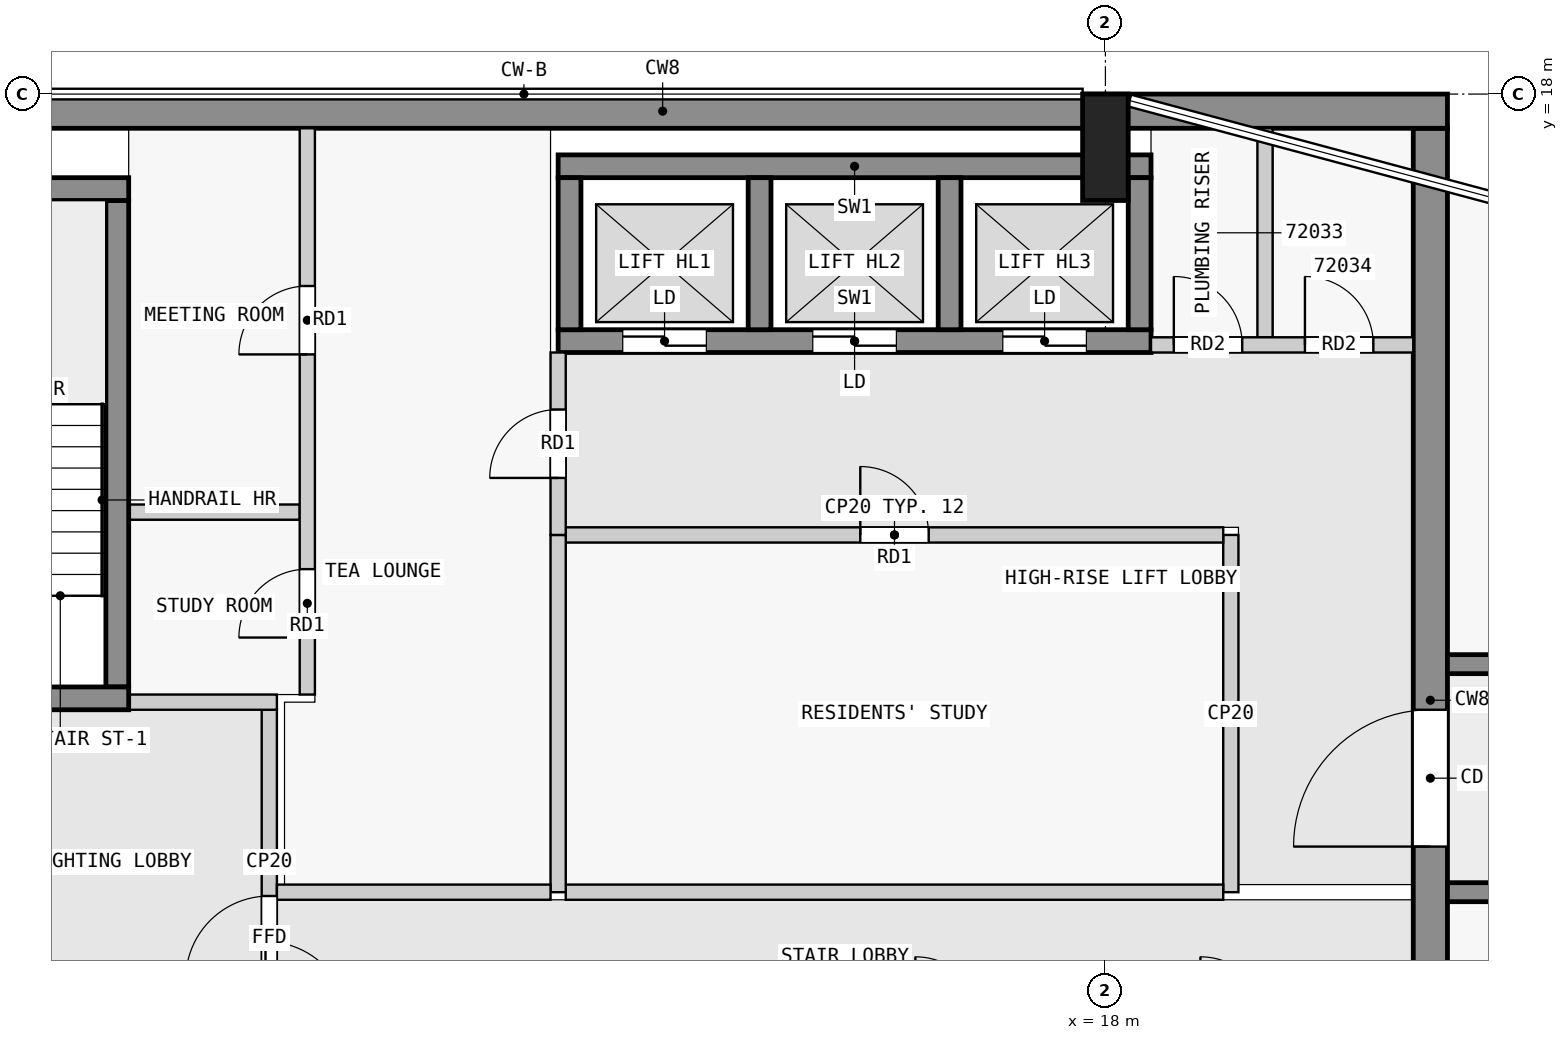
"""IFC4 building model, lengths in metres.
Left out: names, types, materials, properties, quantities, classifications, styles, units other than length and angle.
Written with IfcOpenShell. Run it as: python <this file> out.ifc"""

import sys

from ifc_helpers import new_model, si_unit, direction, frame, frame_2d, origin, origin_2d, place, context, subcontext, project, spatial, rectangle, extrude, element, fill, save


model = new_model("IFC4")
c1 = context("Model", 3, precision=1e-05, world=origin(), true_north=direction((0.0, 1.0)))
c2 = subcontext(c1, "Body", "Model", "MODEL_VIEW")
j1 = project(units=[si_unit("LENGTHUNIT", "METRE"), si_unit("PLANEANGLEUNIT", "RADIAN")], contexts=[c1])
p1 = place(None, origin())
s1 = spatial("IfcSite", under=j1, at=p1, CompositionType="ELEMENT")
p2 = place(p1, origin())
s2 = spatial("IfcBuilding", under=s1, at=p2, CompositionType="ELEMENT")
p3 = place(p2, frame((0.0, 0.0, 273.9)))
s3 = spatial("IfcBuildingStorey", under=s2, at=p3, CompositionType="ELEMENT", Elevation=273.9)
p4 = place(p3, frame((18.0, 17.3, 0.0), z_axis=(0.0, 0.0, 1.0), x_axis=(1.0, 0.0, 0.0)))
e1 = element("IfcColumn", 1, at=p4, inside=s3, PredefinedType="COLUMN", context=c2, shape_type="SweptSolid", body=[
    extrude(rectangle(XDim=0.6, YDim=1.4, at=origin_2d()), origin(), (0.0, 0.0, 1.0), 3.5),
])
p5 = place(p3, frame((1.85, 17.775, 0.0), z_axis=(0.0, 0.0, 1.0), x_axis=(1.0, 0.0, 0.0)))
e2 = element("IfcWall", 2, at=p5, inside=s3, PredefinedType="SHEAR", context=c2, shape_type="SweptSolid", body=[
    extrude(rectangle(XDim=20.65, YDim=0.45, at=frame_2d((10.325, 0.0))), origin(), (0.0, 0.0, 1.0), 3.25),
])
p6 = place(p3, frame((22.275, 2.5, 0.0), z_axis=(0.0, 0.0, 1.0), x_axis=(0.0, 1.0, 0.0)))
e3 = element("IfcWall", 3, at=p6, inside=s3, PredefinedType="SHEAR", context=c2, shape_type="SweptSolid", body=[
    extrude(rectangle(XDim=15.05, YDim=0.45, at=frame_2d((7.525, 0.0))), origin(), (0.0, 0.0, 1.0), 3.25),
])
p7 = place(p6, frame((5.6, 0.0, 0.0)))
e4 = element("IfcOpeningElement", 4, at=p7, cuts=e3, PredefinedType="OPENING", context=c2, shape_type="SweptSolid", body=[
    extrude(rectangle(XDim=1.8, YDim=2.1, at=frame_2d((0.9, 1.05))), frame((0.0, 0.235, 0.0), z_axis=(0.0, -1.0, 0.0), x_axis=(1.0, 0.0, 0.0)), (0.0, 0.0, 1.0), 0.47),
])
p8 = place(p3, frame((2.3, 10.05, 0.0), z_axis=(0.0, 0.0, 1.0), x_axis=(1.0, 0.0, 0.0)))
e5 = element("IfcWall", 5, at=p8, inside=s3, PredefinedType="SHEAR", context=c2, shape_type="SweptSolid", body=[
    extrude(rectangle(XDim=2.85, YDim=0.3, at=frame_2d((1.425, 0.0))), origin(), (0.0, 0.0, 1.0), 3.25),
])
p9 = place(p8, frame((0.25, 0.0, 0.0)))
e6 = element("IfcOpeningElement", 6, at=p9, cuts=e5, PredefinedType="OPENING", context=c2, shape_type="SweptSolid", body=[
    extrude(rectangle(XDim=1.1, YDim=2.1, at=frame_2d((0.55, 1.05))), frame((0.0, 0.16, 0.0), z_axis=(0.0, -1.0, 0.0), x_axis=(1.0, 0.0, 0.0)), (0.0, 0.0, 1.0), 0.32),
])
p10 = place(p3, frame((5.0, 10.2, 0.0), z_axis=(0.0, 0.0, 1.0), x_axis=(0.0, 1.0, 0.0)))
e7 = element("IfcWall", 7, at=p10, inside=s3, PredefinedType="SHEAR", context=c2, shape_type="SweptSolid", body=[
    extrude(rectangle(XDim=6.4, YDim=0.3, at=frame_2d((3.2, 0.0))), origin(), (0.0, 0.0, 1.0), 3.25),
])
p11 = place(p3, frame((2.3, 16.75, 0.0), z_axis=(0.0, 0.0, 1.0), x_axis=(1.0, 0.0, 0.0)))
e8 = element("IfcWall", 8, at=p11, inside=s3, PredefinedType="SHEAR", context=c2, shape_type="SweptSolid", body=[
    extrude(rectangle(XDim=2.85, YDim=0.3, at=frame_2d((1.425, 0.0))), origin(), (0.0, 0.0, 1.0), 3.25),
])
p12 = place(p3, frame((10.8, 17.05, 0.0), z_axis=(0.0, 0.0, 1.0), x_axis=(1.0, 0.0, 0.0)))
e9 = element("IfcWall", 9, at=p12, inside=s3, PredefinedType="SHEAR", context=c2, shape_type="SweptSolid", body=[
    extrude(rectangle(XDim=7.8, YDim=0.3, at=frame_2d((3.9, 0.0))), origin(), (0.0, 0.0, 1.0), 3.25),
])
p13 = place(p3, frame((10.8, 14.75, 0.0), z_axis=(0.0, 0.0, 1.0), x_axis=(1.0, 0.0, 0.0)))
e10 = element("IfcWall", 10, at=p13, inside=s3, PredefinedType="SHEAR", context=c2, shape_type="SweptSolid", body=[
    extrude(rectangle(XDim=7.8, YDim=0.3, at=frame_2d((3.9, 0.0))), origin(), (0.0, 0.0, 1.0), 3.25),
])
p14 = place(p13, frame((0.85, 0.0, 0.0)))
e11 = element("IfcOpeningElement", 11, at=p14, cuts=e10, PredefinedType="OPENING", context=c2, shape_type="SweptSolid", body=[
    extrude(rectangle(XDim=1.1, YDim=2.1, at=frame_2d((0.55, 1.05))), frame((0.0, 0.16, 0.0), z_axis=(0.0, -1.0, 0.0), x_axis=(1.0, 0.0, 0.0)), (0.0, 0.0, 1.0), 0.32),
])
p15 = place(p13, frame((3.35, 0.0, 0.0)))
e12 = element("IfcOpeningElement", 12, at=p15, cuts=e10, PredefinedType="OPENING", context=c2, shape_type="SweptSolid", body=[
    extrude(rectangle(XDim=1.1, YDim=2.1, at=frame_2d((0.55, 1.05))), frame((0.0, 0.16, 0.0), z_axis=(0.0, -1.0, 0.0), x_axis=(1.0, 0.0, 0.0)), (0.0, 0.0, 1.0), 0.32),
])
p16 = place(p13, frame((5.85, 0.0, 0.0)))
e13 = element("IfcOpeningElement", 13, at=p16, cuts=e10, PredefinedType="OPENING", context=c2, shape_type="SweptSolid", body=[
    extrude(rectangle(XDim=1.1, YDim=2.1, at=frame_2d((0.55, 1.05))), frame((0.0, 0.16, 0.0), z_axis=(0.0, -1.0, 0.0), x_axis=(1.0, 0.0, 0.0)), (0.0, 0.0, 1.0), 0.32),
])
for number, where, z_axis, x_axis in (
    (14, (10.95, 14.9, 0.0), (0.0, 0.0, 1.0), (0.0, 1.0, 0.0)),
    (15, (13.45, 14.9, 0.0), (0.0, 0.0, 1.0), (0.0, 1.0, 0.0)),
    (16, (15.95, 14.9, 0.0), (0.0, 0.0, 1.0), (0.0, 1.0, 0.0)),
    (17, (18.45, 14.9, 0.0), (0.0, 0.0, 1.0), (0.0, 1.0, 0.0)),
):
    element("IfcWall", number, at=place(p3, frame(where, z_axis=z_axis, x_axis=x_axis)), inside=s3, PredefinedType="SHEAR", context=c2, shape_type="SweptSolid", body=[
        extrude(rectangle(XDim=2.0, YDim=0.3, at=frame_2d((1.0, 0.0))), origin(), (0.0, 0.0, 1.0), 3.25),
    ])
p17 = place(p3, frame((22.5, 7.5, 0.0), z_axis=(0.0, 0.0, 1.0), x_axis=(1.0, 0.0, 0.0)))
e18 = element("IfcWall", 18, at=p17, inside=s3, PredefinedType="SHEAR", context=c2, shape_type="SweptSolid", body=[
    extrude(rectangle(XDim=22.5, YDim=0.25, at=frame_2d((11.25, 0.0))), origin(), (0.0, 0.0, 1.0), 3.25),
])
p18 = place(p17, frame((1.85, 0.0, 0.0)))
e19 = element("IfcOpeningElement", 19, at=p18, cuts=e18, PredefinedType="OPENING", context=c2, shape_type="SweptSolid", body=[
    extrude(rectangle(XDim=0.9, YDim=2.1, at=frame_2d((0.45, 1.05))), frame((0.0, 0.135, 0.0), z_axis=(0.0, -1.0, 0.0), x_axis=(1.0, 0.0, 0.0)), (0.0, 0.0, 1.0), 0.27),
])
p19 = place(p17, frame((6.25, 0.0, 0.0)))
e20 = element("IfcOpeningElement", 20, at=p19, cuts=e18, PredefinedType="OPENING", context=c2, shape_type="SweptSolid", body=[
    extrude(rectangle(XDim=1.0, YDim=2.1, at=frame_2d((0.5, 1.05))), frame((0.0, 0.135, 0.0), z_axis=(0.0, -1.0, 0.0), x_axis=(1.0, 0.0, 0.0)), (0.0, 0.0, 1.0), 0.27),
])
p20 = place(p17, frame((10.35, 0.0, 0.0)))
e21 = element("IfcOpeningElement", 21, at=p20, cuts=e18, PredefinedType="OPENING", context=c2, shape_type="SweptSolid", body=[
    extrude(rectangle(XDim=1.8, YDim=2.1, at=frame_2d((0.9, 1.05))), frame((0.0, 0.135, 0.0), z_axis=(0.0, -1.0, 0.0), x_axis=(1.0, 0.0, 0.0)), (0.0, 0.0, 1.0), 0.27),
])
p21 = place(p17, frame((16.85, 0.0, 0.0)))
e22 = element("IfcOpeningElement", 22, at=p21, cuts=e18, PredefinedType="OPENING", context=c2, shape_type="SweptSolid", body=[
    extrude(rectangle(XDim=1.0, YDim=2.1, at=frame_2d((0.5, 1.05))), frame((0.0, 0.135, 0.0), z_axis=(0.0, -1.0, 0.0), x_axis=(1.0, 0.0, 0.0)), (0.0, 0.0, 1.0), 0.27),
])
p22 = place(p3, frame((22.5, 10.5, 0.0), z_axis=(0.0, 0.0, 1.0), x_axis=(1.0, 0.0, 0.0)))
e23 = element("IfcWall", 23, at=p22, inside=s3, PredefinedType="SHEAR", context=c2, shape_type="SweptSolid", body=[
    extrude(rectangle(XDim=22.5, YDim=0.25, at=frame_2d((11.25, 0.0))), origin(), (0.0, 0.0, 1.0), 3.25),
])
p23 = place(p22, frame((1.85, 0.0, 0.0)))
e24 = element("IfcOpeningElement", 24, at=p23, cuts=e23, PredefinedType="OPENING", context=c2, shape_type="SweptSolid", body=[
    extrude(rectangle(XDim=0.9, YDim=2.1, at=frame_2d((0.45, 1.05))), frame((0.0, 0.135, 0.0), z_axis=(0.0, -1.0, 0.0), x_axis=(1.0, 0.0, 0.0)), (0.0, 0.0, 1.0), 0.27),
])
p24 = place(p22, frame((10.05, 0.0, 0.0)))
e25 = element("IfcOpeningElement", 25, at=p24, cuts=e23, PredefinedType="OPENING", context=c2, shape_type="SweptSolid", body=[
    extrude(rectangle(XDim=1.0, YDim=2.1, at=frame_2d((0.5, 1.05))), frame((0.0, 0.135, 0.0), z_axis=(0.0, -1.0, 0.0), x_axis=(1.0, 0.0, 0.0)), (0.0, 0.0, 1.0), 0.27),
])
p25 = place(p22, frame((18.75, 0.0, 0.0)))
e26 = element("IfcOpeningElement", 26, at=p25, cuts=e23, PredefinedType="OPENING", context=c2, shape_type="SweptSolid", body=[
    extrude(rectangle(XDim=0.9, YDim=2.1, at=frame_2d((0.45, 1.05))), frame((0.0, 0.135, 0.0), z_axis=(0.0, -1.0, 0.0), x_axis=(1.0, 0.0, 0.0)), (0.0, 0.0, 1.0), 0.27),
])
p26 = place(p22, frame((20.95, 0.0, 0.0)))
e27 = element("IfcOpeningElement", 27, at=p26, cuts=e23, PredefinedType="OPENING", context=c2, shape_type="SweptSolid", body=[
    extrude(rectangle(XDim=1.0, YDim=2.1, at=frame_2d((0.5, 1.05))), frame((0.0, 0.135, 0.0), z_axis=(0.0, -1.0, 0.0), x_axis=(1.0, 0.0, 0.0)), (0.0, 0.0, 1.0), 0.27),
])
p27 = place(p3, frame((7.0, 5.9, 0.0), z_axis=(0.0, 0.0, 1.0), x_axis=(0.0, 1.0, 0.0)))
e28 = element("IfcWall", 28, at=p27, inside=s3, PredefinedType="PARTITIONING", context=c2, shape_type="SweptSolid", body=[
    extrude(rectangle(XDim=4.0, YDim=0.2, at=frame_2d((2.0, 0.0))), origin(), (0.0, 0.0, 1.0), 3.25),
])
p28 = place(p27, frame((0.45, 0.0, 0.0)))
e29 = element("IfcOpeningElement", 29, at=p28, cuts=e28, PredefinedType="OPENING", context=c2, shape_type="SweptSolid", body=[
    extrude(rectangle(XDim=1.1, YDim=2.1, at=frame_2d((0.55, 1.05))), frame((0.0, 0.11, 0.0), z_axis=(0.0, -1.0, 0.0), x_axis=(1.0, 0.0, 0.0)), (0.0, 0.0, 1.0), 0.22),
])
p29 = place(p3, frame((5.15, 10.0, 0.0), z_axis=(0.0, 0.0, 1.0), x_axis=(1.0, 0.0, 0.0)))
e30 = element("IfcWall", 30, at=p29, inside=s3, PredefinedType="PARTITIONING", context=c2, shape_type="SweptSolid", body=[
    extrude(rectangle(XDim=1.95, YDim=0.2, at=frame_2d((0.975, 0.0))), origin(), (0.0, 0.0, 1.0), 3.25),
])
p30 = place(p3, frame((7.1, 7.5, 0.0), z_axis=(0.0, 0.0, 1.0), x_axis=(1.0, 0.0, 0.0)))
e31 = element("IfcWall", 31, at=p30, inside=s3, PredefinedType="PARTITIONING", context=c2, shape_type="SweptSolid", body=[
    extrude(rectangle(XDim=3.6, YDim=0.2, at=frame_2d((1.8, 0.0))), origin(), (0.0, 0.0, 1.0), 3.25),
])
p31 = place(p3, frame((10.8, 12.2, 0.0), z_axis=(0.0, 0.0, 1.0), x_axis=(0.0, 1.0, 0.0)))
e32 = element("IfcWall", 32, at=p31, inside=s3, PredefinedType="PARTITIONING", context=c2, shape_type="SweptSolid", body=[
    extrude(rectangle(XDim=2.4, YDim=0.2, at=frame_2d((1.2, 0.0))), origin(), (0.0, 0.0, 1.0), 3.25),
])
p32 = place(p31, frame((0.75, 0.0, 0.0)))
e33 = element("IfcOpeningElement", 33, at=p32, cuts=e32, PredefinedType="OPENING", context=c2, shape_type="SweptSolid", body=[
    extrude(rectangle(XDim=0.9, YDim=2.1, at=frame_2d((0.45, 1.05))), frame((0.0, 0.11, 0.0), z_axis=(0.0, -1.0, 0.0), x_axis=(1.0, 0.0, 0.0)), (0.0, 0.0, 1.0), 0.22),
])
p33 = place(p3, frame((10.8, 7.5, 0.0), z_axis=(0.0, 0.0, 1.0), x_axis=(0.0, 1.0, 0.0)))
e34 = element("IfcWall", 34, at=p33, inside=s3, PredefinedType="PARTITIONING", context=c2, shape_type="SweptSolid", body=[
    extrude(rectangle(XDim=4.7, YDim=0.2, at=frame_2d((2.35, 0.0))), origin(), (0.0, 0.0, 1.0), 3.25),
])
p34 = place(p3, frame((10.9, 7.5, 0.0), z_axis=(0.0, 0.0, 1.0), x_axis=(1.0, 0.0, 0.0)))
e35 = element("IfcWall", 35, at=p34, inside=s3, PredefinedType="PARTITIONING", context=c2, shape_type="SweptSolid", body=[
    extrude(rectangle(XDim=8.65, YDim=0.2, at=frame_2d((4.325, 0.0))), origin(), (0.0, 0.0, 1.0), 3.25),
])
p35 = place(p3, frame((19.65, 7.5, 0.0), z_axis=(0.0, 0.0, 1.0), x_axis=(0.0, 1.0, 0.0)))
e36 = element("IfcWall", 36, at=p35, inside=s3, PredefinedType="PARTITIONING", context=c2, shape_type="SweptSolid", body=[
    extrude(rectangle(XDim=4.7, YDim=0.2, at=frame_2d((2.35, 0.0))), origin(), (0.0, 0.0, 1.0), 3.25),
])
p36 = place(p3, frame((10.9, 12.2, 0.0), z_axis=(0.0, 0.0, 1.0), x_axis=(1.0, 0.0, 0.0)))
e37 = element("IfcWall", 37, at=p36, inside=s3, PredefinedType="PARTITIONING", context=c2, shape_type="SweptSolid", body=[
    extrude(rectangle(XDim=8.65, YDim=0.2, at=frame_2d((4.325, 0.0))), origin(), (0.0, 0.0, 1.0), 3.25),
])
p37 = place(p36, frame((3.875, 0.0, 0.0)))
e38 = element("IfcOpeningElement", 38, at=p37, cuts=e37, PredefinedType="OPENING", context=c2, shape_type="SweptSolid", body=[
    extrude(rectangle(XDim=0.9, YDim=2.1, at=frame_2d((0.45, 1.05))), frame((0.0, 0.11, 0.0), z_axis=(0.0, -1.0, 0.0), x_axis=(1.0, 0.0, 0.0)), (0.0, 0.0, 1.0), 0.22),
])
p38 = place(p3, frame((7.5, 10.1, 0.0), z_axis=(0.0, 0.0, 1.0), x_axis=(0.0, 1.0, 0.0)))
e39 = element("IfcWall", 39, at=p38, inside=s3, PredefinedType="PARTITIONING", context=c2, shape_type="SweptSolid", body=[
    extrude(rectangle(XDim=7.45, YDim=0.2, at=frame_2d((3.725, 0.0))), origin(), (0.0, 0.0, 1.0), 3.25),
])
p39 = place(p38, frame((0.75, 0.0, 0.0)))
e40 = element("IfcOpeningElement", 40, at=p39, cuts=e39, PredefinedType="OPENING", context=c2, shape_type="SweptSolid", body=[
    extrude(rectangle(XDim=0.9, YDim=2.1, at=frame_2d((0.45, 1.05))), frame((0.0, 0.11, 0.0), z_axis=(0.0, -1.0, 0.0), x_axis=(1.0, 0.0, 0.0)), (0.0, 0.0, 1.0), 0.22),
])
p40 = place(p38, frame((4.475, 0.0, 0.0)))
e41 = element("IfcOpeningElement", 41, at=p40, cuts=e39, PredefinedType="OPENING", context=c2, shape_type="SweptSolid", body=[
    extrude(rectangle(XDim=0.9, YDim=2.1, at=frame_2d((0.45, 1.05))), frame((0.0, 0.11, 0.0), z_axis=(0.0, -1.0, 0.0), x_axis=(1.0, 0.0, 0.0)), (0.0, 0.0, 1.0), 0.22),
])
p41 = place(p3, frame((5.15, 12.5, 0.0), z_axis=(0.0, 0.0, 1.0), x_axis=(1.0, 0.0, 0.0)))
e42 = element("IfcWall", 42, at=p41, inside=s3, PredefinedType="PARTITIONING", context=c2, shape_type="SweptSolid", body=[
    extrude(rectangle(XDim=2.25, YDim=0.2, at=frame_2d((1.125, 0.0))), origin(), (0.0, 0.0, 1.0), 3.25),
])
p42 = place(p3, frame((18.6, 14.7, 0.0), z_axis=(0.0, 0.0, 1.0), x_axis=(1.0, 0.0, 0.0)))
e43 = element("IfcWall", 43, at=p42, inside=s3, PredefinedType="PARTITIONING", context=c2, shape_type="SweptSolid", body=[
    extrude(rectangle(XDim=3.45, YDim=0.2, at=frame_2d((1.725, 0.0))), origin(), (0.0, 0.0, 1.0), 3.25),
])
p43 = place(p42, frame((0.3, 0.0, 0.0)))
e44 = element("IfcOpeningElement", 44, at=p43, cuts=e43, PredefinedType="OPENING", context=c2, shape_type="SweptSolid", body=[
    extrude(rectangle(XDim=0.9, YDim=2.1, at=frame_2d((0.45, 1.05))), frame((0.0, 0.11, 0.0), z_axis=(0.0, -1.0, 0.0), x_axis=(1.0, 0.0, 0.0)), (0.0, 0.0, 1.0), 0.22),
])
p44 = place(p42, frame((2.025, 0.0, 0.0)))
e45 = element("IfcOpeningElement", 45, at=p44, cuts=e43, PredefinedType="OPENING", context=c2, shape_type="SweptSolid", body=[
    extrude(rectangle(XDim=0.9, YDim=2.1, at=frame_2d((0.45, 1.05))), frame((0.0, 0.11, 0.0), z_axis=(0.0, -1.0, 0.0), x_axis=(1.0, 0.0, 0.0)), (0.0, 0.0, 1.0), 0.22),
])
p45 = place(p3, frame((20.1, 14.8, 0.0), z_axis=(0.0, 0.0, 1.0), x_axis=(0.0, 1.0, 0.0)))
e46 = element("IfcWall", 46, at=p45, inside=s3, PredefinedType="PARTITIONING", context=c2, shape_type="SweptSolid", body=[
    extrude(rectangle(XDim=2.75, YDim=0.2, at=frame_2d((1.375, 0.0))), origin(), (0.0, 0.0, 1.0), 3.25),
])
p46 = place(p28, origin())
e47 = element("IfcDoor", 47, at=p46, inside=s3, OperationType="SINGLE_SWING_LEFT", PredefinedType="DOOR", context=c2, shape_type="SweptSolid", body=[
    extrude(rectangle(XDim=1.1, YDim=2.1, at=frame_2d((0.55, 1.05))), frame((0.0, 0.025, 0.0), z_axis=(0.0, -1.0, 0.0), x_axis=(1.0, 0.0, 0.0)), (0.0, 0.0, 1.0), 0.05),
])
fill(e29, e47)
p47 = place(p32, origin())
e48 = element("IfcDoor", 48, at=p47, inside=s3, OperationType="SINGLE_SWING_LEFT", PredefinedType="DOOR", context=c2, shape_type="SweptSolid", body=[
    extrude(rectangle(XDim=0.9, YDim=2.1, at=frame_2d((0.45, 1.05))), frame((0.0, 0.025, 0.0), z_axis=(0.0, -1.0, 0.0), x_axis=(1.0, 0.0, 0.0)), (0.0, 0.0, 1.0), 0.05),
])
fill(e33, e48)
p48 = place(p37, origin())
e49 = element("IfcDoor", 49, at=p48, inside=s3, OperationType="SINGLE_SWING_LEFT", PredefinedType="DOOR", context=c2, shape_type="SweptSolid", body=[
    extrude(rectangle(XDim=0.9, YDim=2.1, at=frame_2d((0.45, 1.05))), frame((0.0, 0.025, 0.0), z_axis=(0.0, -1.0, 0.0), x_axis=(1.0, 0.0, 0.0)), (0.0, 0.0, 1.0), 0.05),
])
fill(e38, e49)
p49 = place(p14, origin())
e50 = element("IfcDoor", 50, at=p49, inside=s3, OperationType="DOUBLE_DOOR_SLIDING", PredefinedType="DOOR", context=c2, shape_type="SweptSolid", body=[
    extrude(rectangle(XDim=1.1, YDim=2.1, at=frame_2d((0.55, 1.05))), frame((0.0, 0.025, 0.0), z_axis=(0.0, -1.0, 0.0), x_axis=(1.0, 0.0, 0.0)), (0.0, 0.0, 1.0), 0.05),
])
fill(e11, e50)
p50 = place(p15, origin())
e51 = element("IfcDoor", 51, at=p50, inside=s3, OperationType="DOUBLE_DOOR_SLIDING", PredefinedType="DOOR", context=c2, shape_type="SweptSolid", body=[
    extrude(rectangle(XDim=1.1, YDim=2.1, at=frame_2d((0.55, 1.05))), frame((0.0, 0.025, 0.0), z_axis=(0.0, -1.0, 0.0), x_axis=(1.0, 0.0, 0.0)), (0.0, 0.0, 1.0), 0.05),
])
fill(e12, e51)
p51 = place(p16, origin())
e52 = element("IfcDoor", 52, at=p51, inside=s3, OperationType="DOUBLE_DOOR_SLIDING", PredefinedType="DOOR", context=c2, shape_type="SweptSolid", body=[
    extrude(rectangle(XDim=1.1, YDim=2.1, at=frame_2d((0.55, 1.05))), frame((0.0, 0.025, 0.0), z_axis=(0.0, -1.0, 0.0), x_axis=(1.0, 0.0, 0.0)), (0.0, 0.0, 1.0), 0.05),
])
fill(e13, e52)
p52 = place(p7, origin())
e53 = element("IfcDoor", 53, at=p52, inside=s3, OperationType="DOUBLE_DOOR_SINGLE_SWING", PredefinedType="DOOR", context=c2, shape_type="SweptSolid", body=[
    extrude(rectangle(XDim=1.8, YDim=2.1, at=frame_2d((0.9, 1.05))), frame((0.0, 0.025, 0.0), z_axis=(0.0, -1.0, 0.0), x_axis=(1.0, 0.0, 0.0)), (0.0, 0.0, 1.0), 0.05),
])
fill(e4, e53)
p53 = place(p39, origin())
e54 = element("IfcDoor", 54, at=p53, inside=s3, OperationType="SINGLE_SWING_RIGHT", PredefinedType="DOOR", context=c2, shape_type="SweptSolid", body=[
    extrude(rectangle(XDim=0.9, YDim=2.1, at=frame_2d((0.45, 1.05))), frame((0.0, 0.025, 0.0), z_axis=(0.0, -1.0, 0.0), x_axis=(1.0, 0.0, 0.0)), (0.0, 0.0, 1.0), 0.05),
])
fill(e40, e54)
p54 = place(p40, origin())
e55 = element("IfcDoor", 55, at=p54, inside=s3, OperationType="SINGLE_SWING_RIGHT", PredefinedType="DOOR", context=c2, shape_type="SweptSolid", body=[
    extrude(rectangle(XDim=0.9, YDim=2.1, at=frame_2d((0.45, 1.05))), frame((0.0, 0.025, 0.0), z_axis=(0.0, -1.0, 0.0), x_axis=(1.0, 0.0, 0.0)), (0.0, 0.0, 1.0), 0.05),
])
fill(e41, e55)
p55 = place(p43, origin())
e56 = element("IfcDoor", 56, at=p55, inside=s3, OperationType="SINGLE_SWING_LEFT", PredefinedType="DOOR", context=c2, shape_type="SweptSolid", body=[
    extrude(rectangle(XDim=0.9, YDim=2.1, at=frame_2d((0.45, 1.05))), frame((0.0, 0.025, 0.0), z_axis=(0.0, -1.0, 0.0), x_axis=(1.0, 0.0, 0.0)), (0.0, 0.0, 1.0), 0.05),
])
fill(e44, e56)
p56 = place(p44, origin())
e57 = element("IfcDoor", 57, at=p56, inside=s3, OperationType="SINGLE_SWING_LEFT", PredefinedType="DOOR", context=c2, shape_type="SweptSolid", body=[
    extrude(rectangle(XDim=0.9, YDim=2.1, at=frame_2d((0.45, 1.05))), frame((0.0, 0.025, 0.0), z_axis=(0.0, -1.0, 0.0), x_axis=(1.0, 0.0, 0.0)), (0.0, 0.0, 1.0), 0.05),
])
fill(e45, e57)
save(model, sys.argv[1])
